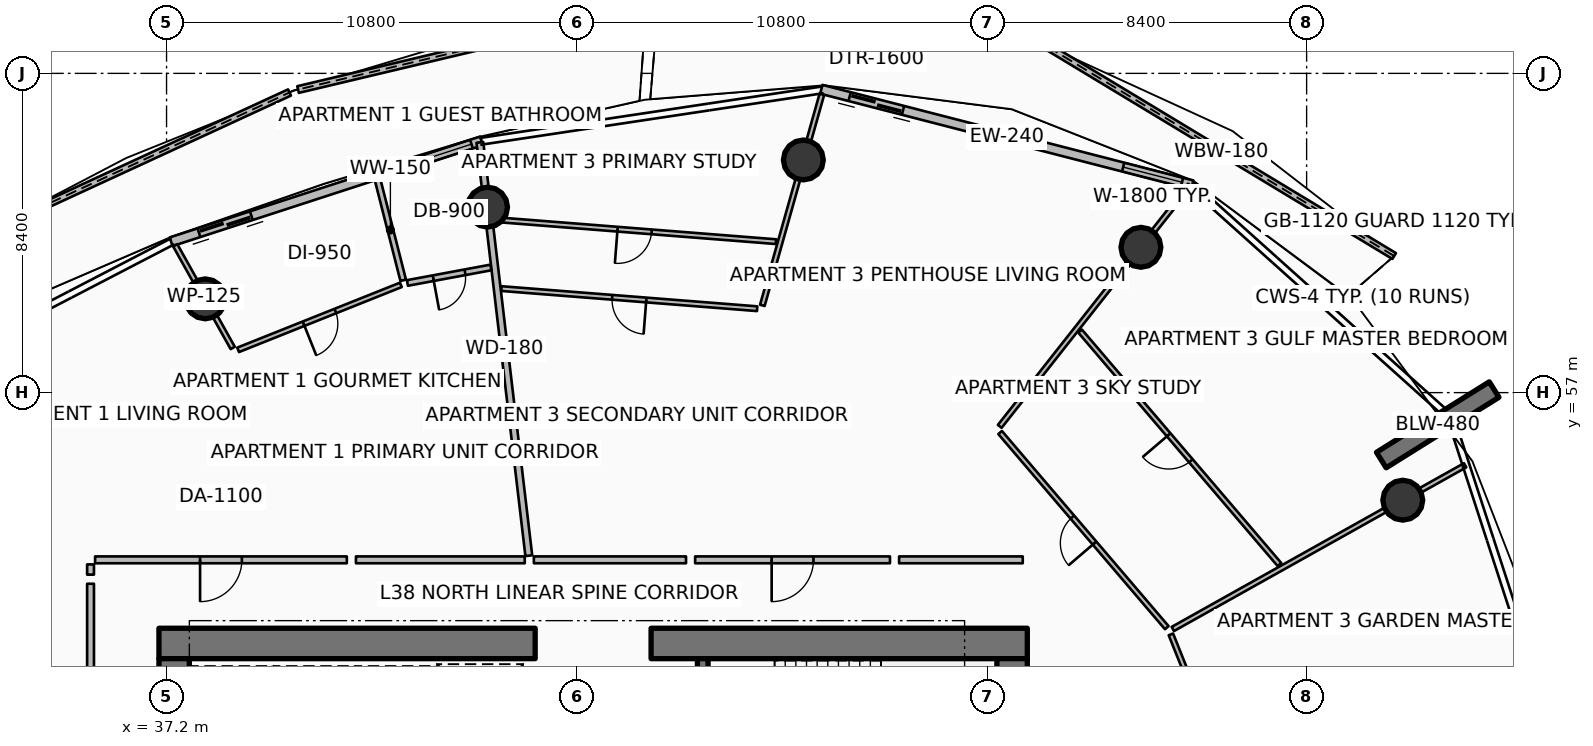
"""IFC4 building model, lengths in metres.
Left out: names, types, materials, properties, quantities, classifications, styles, units other than length and angle.
Written with IfcOpenShell. Run it as: python <this file> out.ifc"""

import sys

from ifc_helpers import new_model, si_unit, direction, frame, frame_2d, origin, origin_2d, place, context, subcontext, project, spatial, polyline, rectangle, circle, outline, extrude, element, fill, save


model = new_model("IFC4")
c1 = context("Model", 3, precision=1e-05, world=origin(), true_north=direction((0.0, 1.0)))
c2 = subcontext(c1, "Body", "Model", "MODEL_VIEW")
j1 = project(units=[si_unit("LENGTHUNIT", "METRE"), si_unit("PLANEANGLEUNIT", "RADIAN")], contexts=[c1])
p1 = place(None, origin())
s1 = spatial("IfcSite", under=j1, at=p1, CompositionType="ELEMENT")
p2 = place(p1, origin())
s2 = spatial("IfcBuilding", under=s1, at=p2, CompositionType="ELEMENT")
p3 = place(p2, frame((0.0, 0.0, 154.05)))
s3 = spatial("IfcBuildingStorey", under=s2, at=p3, CompositionType="ELEMENT", Elevation=154.05)
p4 = place(p3, frame((37.0, 50.4, 0.0), z_axis=(0.0, 0.0, 1.0), x_axis=(1.0, 0.0, 0.0)))
e1 = element("IfcWall", 1, at=p4, inside=s3, PredefinedType="SHEAR", context=c2, shape_type="SweptSolid", body=[
    extrude(rectangle(XDim=9.9, YDim=0.8, at=frame_2d((4.95, 0.0))), origin(), (0.0, 0.0, 1.0), 3.75),
])
p5 = place(p3, frame((49.95, 50.4, 0.0), z_axis=(0.0, 0.0, 1.0), x_axis=(1.0, 0.0, 0.0)))
e2 = element("IfcWall", 2, at=p5, inside=s3, PredefinedType="SHEAR", context=c2, shape_type="SweptSolid", body=[
    extrude(rectangle(XDim=9.9, YDim=0.8, at=frame_2d((4.95, 0.0))), origin(), (0.0, 0.0, 1.0), 3.75),
])
for number, where, z_axis, x_axis in (
    (3, (37.4, 34.0, 0.0), (0.0, 0.0, 1.0), (0.0, 1.0, 0.0)),
    (4, (59.45, 34.0, 0.0), (0.0, 0.0, 1.0), (0.0, 1.0, 0.0)),
):
    element("IfcWall", number, at=place(p3, frame(where, z_axis=z_axis, x_axis=x_axis)), inside=s3, PredefinedType="SHEAR", context=c2, shape_type="SweptSolid", body=[
        extrude(rectangle(XDim=16.0, YDim=0.8, at=frame_2d((8.0, 0.0))), origin(), (0.0, 0.0, 1.0), 3.75),
    ])
p6 = place(p3, frame((51.31, 46.5, 0.0), z_axis=(0.0, 0.0, 1.0), x_axis=(0.0, 1.0, 0.0)))
e5 = element("IfcWall", 5, at=p6, inside=s3, PredefinedType="SHEAR", context=c2, shape_type="SweptSolid", body=[
    extrude(rectangle(XDim=3.5, YDim=0.28, at=frame_2d((1.75, 0.0))), origin(), (0.0, 0.0, 1.0), 3.75),
])
p7 = place(p3, frame((69.165, 55.226, 0.0), z_axis=(0.0, 0.0, 1.0), x_axis=(0.848053161125, 0.529911158502, 0.0)))
e6 = element("IfcWall", 6, at=p7, inside=s3, PredefinedType="SOLIDWALL", context=c2, shape_type="SweptSolid", body=[
    extrude(rectangle(XDim=3.5, YDim=0.48, at=frame_2d((1.75, 0.0))), origin(), (0.0, 0.0, 1.0), 3.75),
])
for number, where, z_axis, x_axis in (
    (7, (69.73, 54.169, 0.0), (0.0, 0.0, 1.0), (1.0, 0.0, 0.0)),
    (8, (62.84, 60.824, 0.0), (0.0, 0.0, 1.0), (1.0, 0.0, 0.0)),
    (9, (53.957, 63.122, 0.0), (0.0, 0.0, 1.0), (1.0, 0.0, 0.0)),
    (10, (45.647, 61.881, 0.0), (0.0, 0.0, 1.0), (1.0, 0.0, 0.0)),
    (11, (38.218, 59.467, 0.0), (0.0, 0.0, 1.0), (1.0, 0.0, 0.0)),
):
    element("IfcColumn", number, at=place(p3, frame(where, z_axis=z_axis, x_axis=x_axis)), inside=s3, PredefinedType="COLUMN", context=c2, shape_type="SweptSolid", body=[
        extrude(circle(Radius=0.525, at=origin_2d()), origin(), (0.0, 0.0, 1.0), 3.5),
    ])
p8 = place(p3, frame((69.503, 60.594, 0.0), z_axis=(0.0, 0.0, 1.0), x_axis=(-0.856001332464, 0.516973615207, 0.0)))
e12 = element("IfcWall", 12, at=p8, inside=s3, PredefinedType="PARAPET", context=c2, shape_type="SweptSolid", body=[
    extrude(outline(polyline([(0.0, 0.0), (10.626, 0.0), (10.626, 1.348), (5.313, 1.182), (0.0, 1.12), (0.0, 0.0)])), frame((0.0, 0.09, 0.0), z_axis=(0.0, -1.0, 0.0), x_axis=(1.0, 0.0, 0.0)), (0.0, 0.0, 1.0), 0.18),
])
p9 = place(p3, frame((49.825, 67.151, 0.0), z_axis=(0.0, 0.0, 1.0), x_axis=(-0.972947039014, -0.231028265098, 0.0)))
e13 = element("IfcWall", 13, at=p9, inside=s3, PredefinedType="PARAPET", context=c2, shape_type="SweptSolid", body=[
    extrude(outline(polyline([(0.0, 0.0), (9.419, 0.0), (9.419, 1.832), (4.709, 1.853), (0.0, 1.756), (0.0, 0.0)])), frame((0.0, 0.09, 0.0), z_axis=(0.0, -1.0, 0.0), x_axis=(1.0, 0.0, 0.0)), (0.0, 0.0, 1.0), 0.18),
])
p10 = place(p3, frame((40.435, 64.897, 0.0), z_axis=(0.0, 0.0, 1.0), x_axis=(-0.908087442579, -0.418780606799, 0.0)))
e14 = element("IfcWall", 14, at=p10, inside=s3, PredefinedType="PARAPET", context=c2, shape_type="SweptSolid", body=[
    extrude(outline(polyline([(0.0, 0.0), (9.315, 0.0), (9.315, 1.497), (4.658, 1.696), (0.0, 1.832), (0.0, 0.0)])), frame((0.0, 0.09, 0.0), z_axis=(0.0, -1.0, 0.0), x_axis=(1.0, 0.0, 0.0)), (0.0, 0.0, 1.0), 0.18),
])
p11 = place(p3, frame((64.192, 62.466, 0.0), z_axis=(0.0, 0.0, 1.0), x_axis=(-0.968379685126, 0.249481032214, 0.0)))
e15 = element("IfcWall", 15, at=p11, inside=s3, PredefinedType="SOLIDWALL", context=c2, shape_type="SweptSolid", body=[
    extrude(rectangle(XDim=10.082, YDim=0.24, at=frame_2d((5.041, 0.0))), origin(), (0.0, 0.0, 1.0), 2.45),
])
p12 = place(p11, frame((7.862, 0.0, 0.0)))
e16 = element("IfcOpeningElement", 16, at=p12, cuts=e15, PredefinedType="OPENING", context=c2, shape_type="SweptSolid", body=[
    extrude(rectangle(XDim=1.45, YDim=2.15, at=frame_2d((0.725, 1.075))), frame((0.0, 0.13, 0.0), z_axis=(0.0, -1.0, 0.0), x_axis=(1.0, 0.0, 0.0)), (0.0, 0.0, 1.0), 0.26),
])
p13 = place(p11, frame((0.28, 0.0, 0.65)))
e17 = element("IfcOpeningElement", 17, at=p13, cuts=e15, PredefinedType="OPENING", context=c2, shape_type="SweptSolid", body=[
    extrude(rectangle(XDim=1.6, YDim=1.5, at=frame_2d((0.8, 0.75))), frame((0.0, 0.13, 0.0), z_axis=(0.0, -1.0, 0.0), x_axis=(1.0, 0.0, 0.0)), (0.0, 0.0, 1.0), 0.26),
])
p14 = place(p3, frame((45.49, 63.624, 0.0), z_axis=(0.0, 0.0, 1.0), x_axis=(-0.951046390632, -0.309048156224, 0.0)))
e18 = element("IfcWall", 18, at=p14, inside=s3, PredefinedType="SOLIDWALL", context=c2, shape_type="SweptSolid", body=[
    extrude(rectangle(XDim=8.59, YDim=0.24, at=frame_2d((4.295, 0.0))), origin(), (0.0, 0.0, 1.0), 2.45),
])
p15 = place(p14, frame((6.37, 0.0, 0.0)))
e19 = element("IfcOpeningElement", 19, at=p15, cuts=e18, PredefinedType="OPENING", context=c2, shape_type="SweptSolid", body=[
    extrude(rectangle(XDim=1.45, YDim=2.15, at=frame_2d((0.725, 1.075))), frame((0.0, 0.13, 0.0), z_axis=(0.0, -1.0, 0.0), x_axis=(1.0, 0.0, 0.0)), (0.0, 0.0, 1.0), 0.26),
])
p16 = place(p14, frame((0.28, 0.0, 0.65)))
e20 = element("IfcOpeningElement", 20, at=p16, cuts=e18, PredefinedType="OPENING", context=c2, shape_type="SweptSolid", body=[
    extrude(rectangle(XDim=1.6, YDim=1.5, at=frame_2d((0.8, 0.75))), frame((0.0, 0.13, 0.0), z_axis=(0.0, -1.0, 0.0), x_axis=(1.0, 0.0, 0.0)), (0.0, 0.0, 1.0), 0.26),
])
p17 = place(p3, frame((46.732, 52.709, 0.0), z_axis=(0.0, 0.0, 1.0), x_axis=(-0.117537145285, 0.993068486802, 0.0)))
e21 = element("IfcWall", 21, at=p17, inside=s3, PredefinedType="PARTITIONING", context=c2, shape_type="SweptSolid", body=[
    extrude(rectangle(XDim=10.951, YDim=0.18, at=frame_2d((5.475, 0.0))), origin(), (0.0, 0.0, 1.0), 2.94),
])
p18 = place(p3, frame((41.944, 52.6, 0.0), z_axis=(0.0, 0.0, 1.0), x_axis=(-1.0, 0.0, 0.0)))
e22 = element("IfcWall", 22, at=p18, inside=s3, PredefinedType="PARTITIONING", context=c2, shape_type="SweptSolid", body=[
    extrude(rectangle(XDim=6.624, YDim=0.18, at=frame_2d((3.312, 0.0))), origin(), (0.0, 0.0, 1.0), 2.94),
])
p19 = place(p18, frame((2.762, 0.0, 0.0)))
e23 = element("IfcOpeningElement", 23, at=p19, cuts=e22, PredefinedType="OPENING", context=c2, shape_type="SweptSolid", body=[
    extrude(rectangle(XDim=1.1, YDim=2.1, at=frame_2d((0.55, 1.05))), frame((0.0, 0.1, 0.0), z_axis=(0.0, -1.0, 0.0), x_axis=(1.0, 0.0, 0.0)), (0.0, 0.0, 1.0), 0.2),
])
p20 = place(p3, frame((35.2, 52.48, 0.0), z_axis=(0.0, 0.0, 1.0), x_axis=(0.0, -1.0, 0.0)))
e24 = element("IfcWall", 24, at=p20, inside=s3, PredefinedType="PARTITIONING", context=c2, shape_type="SweptSolid", body=[
    extrude(rectangle(XDim=0.269, YDim=0.18, at=frame_2d((0.135, 0.0))), origin(), (0.0, 0.0, 1.0), 2.94),
])
p21 = place(p3, frame((46.625, 52.6, 0.0), z_axis=(0.0, 0.0, 1.0), x_axis=(-1.0, 0.0, 0.0)))
e25 = element("IfcWall", 25, at=p21, inside=s3, PredefinedType="PARTITIONING", context=c2, shape_type="SweptSolid", body=[
    extrude(rectangle(XDim=4.442, YDim=0.18, at=frame_2d((2.221, 0.0))), origin(), (0.0, 0.0, 1.0), 2.94),
])
p22 = place(p3, frame((38.941, 58.175, 0.0), z_axis=(0.0, 0.0, 1.0), x_axis=(-0.488620181058, 0.872496600946, 0.0)))
e26 = element("IfcWall", 26, at=p22, inside=s3, PredefinedType="PARTITIONING", context=c2, shape_type="SweptSolid", body=[
    extrude(rectangle(XDim=3.095, YDim=0.125, at=frame_2d((1.548, 0.0))), origin(), (0.0, 0.0, 1.0), 2.94),
])
p23 = place(p3, frame((45.734, 60.293, 0.0), z_axis=(0.0, 0.0, 1.0), x_axis=(-0.983182569162, -0.182625397184, 0.0)))
e27 = element("IfcWall", 27, at=p23, inside=s3, PredefinedType="PARTITIONING", context=c2, shape_type="SweptSolid", body=[
    extrude(rectangle(XDim=2.234, YDim=0.15, at=frame_2d((1.117, 0.0))), origin(), (0.0, 0.0, 1.0), 2.94),
])
p24 = place(p23, frame((0.692, 0.0, 0.0)))
e28 = element("IfcOpeningElement", 28, at=p24, cuts=e27, PredefinedType="OPENING", context=c2, shape_type="SweptSolid", body=[
    extrude(rectangle(XDim=0.85, YDim=2.06, at=frame_2d((0.425, 1.03))), frame((0.0, 0.085, 0.0), z_axis=(0.0, -1.0, 0.0), x_axis=(1.0, 0.0, 0.0)), (0.0, 0.0, 1.0), 0.17),
])
p25 = place(p3, frame((43.427, 59.956, 0.0), z_axis=(0.0, 0.0, 1.0), x_axis=(-0.246779972966, 0.969071537578, 0.0)))
e29 = element("IfcWall", 29, at=p25, inside=s3, PredefinedType="PARTITIONING", context=c2, shape_type="SweptSolid", body=[
    extrude(rectangle(XDim=2.732, YDim=0.15, at=frame_2d((1.366, 0.0))), origin(), (0.0, 0.0, 1.0), 2.94),
])
p26 = place(p3, frame((43.366, 59.835, 0.0), z_axis=(0.0, 0.0, 1.0), x_axis=(-0.928691950022, -0.370852075584, 0.0)))
e30 = element("IfcWall", 30, at=p26, inside=s3, PredefinedType="PARTITIONING", context=c2, shape_type="SweptSolid", body=[
    extrude(rectangle(XDim=4.612, YDim=0.125, at=frame_2d((2.306, 0.0))), origin(), (0.0, 0.0, 1.0), 2.94),
])
p27 = place(p26, frame((1.856, 0.0, 0.0)))
e31 = element("IfcOpeningElement", 31, at=p27, cuts=e30, PredefinedType="OPENING", context=c2, shape_type="SweptSolid", body=[
    extrude(rectangle(XDim=0.9, YDim=2.08, at=frame_2d((0.45, 1.04))), frame((0.0, 0.073, 0.0), z_axis=(0.0, -1.0, 0.0), x_axis=(1.0, 0.0, 0.0)), (0.0, 0.0, 1.0), 0.145),
])
p28 = place(p3, frame((35.2, 51.971, 0.0), z_axis=(0.0, 0.0, 1.0), x_axis=(0.0, -1.0, 0.0)))
e32 = element("IfcWall", 32, at=p28, inside=s3, PredefinedType="PARTITIONING", context=c2, shape_type="SweptSolid", body=[
    extrude(rectangle(XDim=6.241, YDim=0.18, at=frame_2d((3.12, 0.0))), origin(), (0.0, 0.0, 1.0), 2.94),
])
p29 = place(p3, frame((56.236, 52.6, 0.0), z_axis=(0.0, 0.0, 1.0), x_axis=(-1.0, 0.0, 0.0)))
e33 = element("IfcWall", 33, at=p29, inside=s3, PredefinedType="PARTITIONING", context=c2, shape_type="SweptSolid", body=[
    extrude(rectangle(XDim=5.127, YDim=0.18, at=frame_2d((2.563, 0.0))), origin(), (0.0, 0.0, 1.0), 2.94),
])
p30 = place(p29, frame((2.013, 0.0, 0.0)))
e34 = element("IfcOpeningElement", 34, at=p30, cuts=e33, PredefinedType="OPENING", context=c2, shape_type="SweptSolid", body=[
    extrude(rectangle(XDim=1.1, YDim=2.1, at=frame_2d((0.55, 1.05))), frame((0.0, 0.1, 0.0), z_axis=(0.0, -1.0, 0.0), x_axis=(1.0, 0.0, 0.0)), (0.0, 0.0, 1.0), 0.2),
])
p31 = place(p3, frame((65.275, 46.532, 0.0), z_axis=(0.0, 0.0, 1.0), x_axis=(-0.372161107737, 0.928168147421, 0.0)))
e35 = element("IfcWall", 35, at=p31, inside=s3, PredefinedType="PARTITIONING", context=c2, shape_type="SweptSolid", body=[
    extrude(rectangle(XDim=4.425, YDim=0.125, at=frame_2d((2.212, 0.0))), origin(), (0.0, 0.0, 1.0), 2.94),
])
p32 = place(p31, frame((1.762, 0.0, 0.0)))
e36 = element("IfcOpeningElement", 36, at=p32, cuts=e35, PredefinedType="OPENING", context=c2, shape_type="SweptSolid", body=[
    extrude(rectangle(XDim=0.9, YDim=2.08, at=frame_2d((0.45, 1.04))), frame((0.0, 0.073, 0.0), z_axis=(0.0, -1.0, 0.0), x_axis=(1.0, 0.0, 0.0)), (0.0, 0.0, 1.0), 0.145),
])
p33 = place(p3, frame((59.73, 52.6, 0.0), z_axis=(0.0, 0.0, 1.0), x_axis=(-1.0, 0.0, 0.0)))
e37 = element("IfcWall", 37, at=p33, inside=s3, PredefinedType="PARTITIONING", context=c2, shape_type="SweptSolid", body=[
    extrude(rectangle(XDim=3.254, YDim=0.18, at=frame_2d((1.627, 0.0))), origin(), (0.0, 0.0, 1.0), 2.94),
])
p34 = place(p3, frame((63.679, 50.781, 0.0), z_axis=(0.0, 0.0, 1.0), x_axis=(0.872493265844, 0.488626136281, 0.0)))
e38 = element("IfcWall", 38, at=p34, inside=s3, PredefinedType="PARTITIONING", context=c2, shape_type="SweptSolid", body=[
    extrude(rectangle(XDim=8.816, YDim=0.125, at=frame_2d((4.408, 0.0))), origin(), (0.0, 0.0, 1.0), 2.94),
])
p35 = place(p3, frame((59.125, 56.112, 0.0), z_axis=(0.0, 0.0, 1.0), x_axis=(0.61910151414, 0.78531096719, 0.0)))
e39 = element("IfcWall", 39, at=p35, inside=s3, PredefinedType="PARTITIONING", context=c2, shape_type="SweptSolid", body=[
    extrude(rectangle(XDim=8.082, YDim=0.125, at=frame_2d((4.041, 0.0))), origin(), (0.0, 0.0, 1.0), 2.94),
])
p36 = place(p3, frame((63.52, 50.815, 0.0), z_axis=(0.0, 0.0, 1.0), x_axis=(-0.649447526186, 0.760406411553, 0.0)))
e40 = element("IfcWall", 40, at=p36, inside=s3, PredefinedType="PARTITIONING", context=c2, shape_type="SweptSolid", body=[
    extrude(rectangle(XDim=6.753, YDim=0.125, at=frame_2d((3.376, 0.0))), origin(), (0.0, 0.0, 1.0), 2.94),
])
p37 = place(p36, frame((2.926, 0.0, 0.0)))
e41 = element("IfcOpeningElement", 41, at=p37, cuts=e40, PredefinedType="OPENING", context=c2, shape_type="SweptSolid", body=[
    extrude(rectangle(XDim=0.9, YDim=2.08, at=frame_2d((0.45, 1.04))), frame((0.0, 0.073, 0.0), z_axis=(0.0, -1.0, 0.0), x_axis=(1.0, 0.0, 0.0)), (0.0, 0.0, 1.0), 0.145),
])
p38 = place(p3, frame((66.486, 52.476, 0.0), z_axis=(0.0, 0.0, 1.0), x_axis=(-0.649426515446, 0.760424355894, 0.0)))
e42 = element("IfcWall", 42, at=p38, inside=s3, PredefinedType="PARTITIONING", context=c2, shape_type="SweptSolid", body=[
    extrude(rectangle(XDim=8.079, YDim=0.125, at=frame_2d((4.04, 0.0))), origin(), (0.0, 0.0, 1.0), 2.94),
])
p39 = place(p38, frame((3.589, 0.0, 0.0)))
e43 = element("IfcOpeningElement", 43, at=p39, cuts=e42, PredefinedType="OPENING", context=c2, shape_type="SweptSolid", body=[
    extrude(rectangle(XDim=0.9, YDim=2.08, at=frame_2d((0.45, 1.04))), frame((0.0, 0.073, 0.0), z_axis=(0.0, -1.0, 0.0), x_axis=(1.0, 0.0, 0.0)), (0.0, 0.0, 1.0), 0.145),
])
p40 = place(p3, frame((50.869, 52.6, 0.0), z_axis=(0.0, 0.0, 1.0), x_axis=(-1.0, 0.0, 0.0)))
e44 = element("IfcWall", 44, at=p40, inside=s3, PredefinedType="PARTITIONING", context=c2, shape_type="SweptSolid", body=[
    extrude(rectangle(XDim=4.004, YDim=0.18, at=frame_2d((2.002, 0.0))), origin(), (0.0, 0.0, 1.0), 2.94),
])
p41 = place(p3, frame((52.878, 59.295, 0.0), z_axis=(0.0, 0.0, 1.0), x_axis=(0.271461170106, 0.962449392501, 0.0)))
e45 = element("IfcWall", 45, at=p41, inside=s3, PredefinedType="PARTITIONING", context=c2, shape_type="SweptSolid", body=[
    extrude(rectangle(XDim=5.769, YDim=0.125, at=frame_2d((2.885, 0.0))), origin(), (0.0, 0.0, 1.0), 2.94),
])
p42 = place(p3, frame((52.741, 59.208, 0.0), z_axis=(0.0, 0.0, 1.0), x_axis=(-0.996917452966, 0.078457580711, 0.0)))
e46 = element("IfcWall", 46, at=p42, inside=s3, PredefinedType="PARTITIONING", context=c2, shape_type="SweptSolid", body=[
    extrude(rectangle(XDim=6.752, YDim=0.125, at=frame_2d((3.376, 0.0))), origin(), (0.0, 0.0, 1.0), 2.94),
])
p43 = place(p42, frame((2.926, 0.0, 0.0)))
e47 = element("IfcOpeningElement", 47, at=p43, cuts=e46, PredefinedType="OPENING", context=c2, shape_type="SweptSolid", body=[
    extrude(rectangle(XDim=0.9, YDim=2.08, at=frame_2d((0.45, 1.04))), frame((0.0, 0.073, 0.0), z_axis=(0.0, -1.0, 0.0), x_axis=(1.0, 0.0, 0.0)), (0.0, 0.0, 1.0), 0.145),
])
p44 = place(p3, frame((53.239, 60.972, 0.0), z_axis=(0.0, 0.0, 1.0), x_axis=(-0.996916953075, 0.078463932292, 0.0)))
e48 = element("IfcWall", 48, at=p44, inside=s3, PredefinedType="PARTITIONING", context=c2, shape_type="SweptSolid", body=[
    extrude(rectangle(XDim=7.468, YDim=0.125, at=frame_2d((3.734, 0.0))), origin(), (0.0, 0.0, 1.0), 2.94),
])
p45 = place(p44, frame((3.284, 0.0, 0.0)))
e49 = element("IfcOpeningElement", 49, at=p45, cuts=e48, PredefinedType="OPENING", context=c2, shape_type="SweptSolid", body=[
    extrude(rectangle(XDim=0.9, YDim=2.08, at=frame_2d((0.45, 1.04))), frame((0.0, 0.073, 0.0), z_axis=(0.0, -1.0, 0.0), x_axis=(1.0, 0.0, 0.0)), (0.0, 0.0, 1.0), 0.145),
])
p46 = place(p12, origin())
e50 = element("IfcDoor", 50, at=p46, inside=s3, OperationType="DOUBLE_DOOR_SLIDING", PredefinedType="DOOR", context=c2, shape_type="SweptSolid", body=[
    extrude(rectangle(XDim=1.45, YDim=2.15, at=frame_2d((0.725, 1.075))), frame((0.0, 0.025, 0.0), z_axis=(0.0, -1.0, 0.0), x_axis=(1.0, 0.0, 0.0)), (0.0, 0.0, 1.0), 0.05),
])
fill(e16, e50)
p47 = place(p13, origin())
e51 = element("IfcWindow", 51, at=p47, inside=s3, PartitioningType="SINGLE_PANEL", PredefinedType="WINDOW", context=c2, shape_type="SweptSolid", body=[
    extrude(rectangle(XDim=1.6, YDim=1.5, at=frame_2d((0.8, 0.75))), frame((0.0, 0.03, 0.0), z_axis=(0.0, -1.0, 0.0), x_axis=(1.0, 0.0, 0.0)), (0.0, 0.0, 1.0), 0.06),
])
fill(e17, e51)
p48 = place(p15, origin())
e52 = element("IfcDoor", 52, at=p48, inside=s3, OperationType="DOUBLE_DOOR_SLIDING", PredefinedType="DOOR", context=c2, shape_type="SweptSolid", body=[
    extrude(rectangle(XDim=1.45, YDim=2.15, at=frame_2d((0.725, 1.075))), frame((0.0, 0.025, 0.0), z_axis=(0.0, -1.0, 0.0), x_axis=(1.0, 0.0, 0.0)), (0.0, 0.0, 1.0), 0.05),
])
fill(e19, e52)
p49 = place(p16, origin())
e53 = element("IfcWindow", 53, at=p49, inside=s3, PartitioningType="SINGLE_PANEL", PredefinedType="WINDOW", context=c2, shape_type="SweptSolid", body=[
    extrude(rectangle(XDim=1.6, YDim=1.5, at=frame_2d((0.8, 0.75))), frame((0.0, 0.03, 0.0), z_axis=(0.0, -1.0, 0.0), x_axis=(1.0, 0.0, 0.0)), (0.0, 0.0, 1.0), 0.06),
])
fill(e20, e53)
p50 = place(p19, origin())
e54 = element("IfcDoor", 54, at=p50, inside=s3, OperationType="SINGLE_SWING_RIGHT", PredefinedType="DOOR", context=c2, shape_type="SweptSolid", body=[
    extrude(rectangle(XDim=1.1, YDim=2.1, at=frame_2d((0.55, 1.05))), frame((0.0, 0.025, 0.0), z_axis=(0.0, -1.0, 0.0), x_axis=(1.0, 0.0, 0.0)), (0.0, 0.0, 1.0), 0.05),
])
fill(e23, e54)
p51 = place(p24, origin())
e55 = element("IfcDoor", 55, at=p51, inside=s3, OperationType="SINGLE_SWING_RIGHT", PredefinedType="DOOR", context=c2, shape_type="SweptSolid", body=[
    extrude(rectangle(XDim=0.85, YDim=2.06, at=frame_2d((0.425, 1.03))), frame((0.0, 0.025, 0.0), z_axis=(0.0, -1.0, 0.0), x_axis=(1.0, 0.0, 0.0)), (0.0, 0.0, 1.0), 0.05),
])
fill(e28, e55)
p52 = place(p27, origin())
e56 = element("IfcDoor", 56, at=p52, inside=s3, OperationType="SINGLE_SWING_RIGHT", PredefinedType="DOOR", context=c2, shape_type="SweptSolid", body=[
    extrude(rectangle(XDim=0.9, YDim=2.08, at=frame_2d((0.45, 1.04))), frame((0.0, 0.025, 0.0), z_axis=(0.0, -1.0, 0.0), x_axis=(1.0, 0.0, 0.0)), (0.0, 0.0, 1.0), 0.05),
])
fill(e31, e56)
p53 = place(p30, origin())
e57 = element("IfcDoor", 57, at=p53, inside=s3, OperationType="SINGLE_SWING_RIGHT", PredefinedType="DOOR", context=c2, shape_type="SweptSolid", body=[
    extrude(rectangle(XDim=1.1, YDim=2.1, at=frame_2d((0.55, 1.05))), frame((0.0, 0.025, 0.0), z_axis=(0.0, -1.0, 0.0), x_axis=(1.0, 0.0, 0.0)), (0.0, 0.0, 1.0), 0.05),
])
fill(e34, e57)
p54 = place(p37, origin())
e58 = element("IfcDoor", 58, at=p54, inside=s3, OperationType="SINGLE_SWING_LEFT", PredefinedType="DOOR", context=c2, shape_type="SweptSolid", body=[
    extrude(rectangle(XDim=0.9, YDim=2.08, at=frame_2d((0.45, 1.04))), frame((0.0, 0.025, 0.0), z_axis=(0.0, -1.0, 0.0), x_axis=(1.0, 0.0, 0.0)), (0.0, 0.0, 1.0), 0.05),
])
fill(e41, e58)
p55 = place(p39, origin())
e59 = element("IfcDoor", 59, at=p55, inside=s3, OperationType="SINGLE_SWING_RIGHT", PredefinedType="DOOR", context=c2, shape_type="SweptSolid", body=[
    extrude(rectangle(XDim=0.9, YDim=2.08, at=frame_2d((0.45, 1.04))), frame((0.0, 0.025, 0.0), z_axis=(0.0, -1.0, 0.0), x_axis=(1.0, 0.0, 0.0)), (0.0, 0.0, 1.0), 0.05),
])
fill(e43, e59)
p56 = place(p43, origin())
e60 = element("IfcDoor", 60, at=p56, inside=s3, OperationType="SINGLE_SWING_LEFT", PredefinedType="DOOR", context=c2, shape_type="SweptSolid", body=[
    extrude(rectangle(XDim=0.9, YDim=2.08, at=frame_2d((0.45, 1.04))), frame((0.0, 0.025, 0.0), z_axis=(0.0, -1.0, 0.0), x_axis=(1.0, 0.0, 0.0)), (0.0, 0.0, 1.0), 0.05),
])
fill(e47, e60)
p57 = place(p45, origin())
e61 = element("IfcDoor", 61, at=p57, inside=s3, OperationType="SINGLE_SWING_RIGHT", PredefinedType="DOOR", context=c2, shape_type="SweptSolid", body=[
    extrude(rectangle(XDim=0.9, YDim=2.08, at=frame_2d((0.45, 1.04))), frame((0.0, 0.025, 0.0), z_axis=(0.0, -1.0, 0.0), x_axis=(1.0, 0.0, 0.0)), (0.0, 0.0, 1.0), 0.05),
])
fill(e49, e61)
save(model, sys.argv[1])
